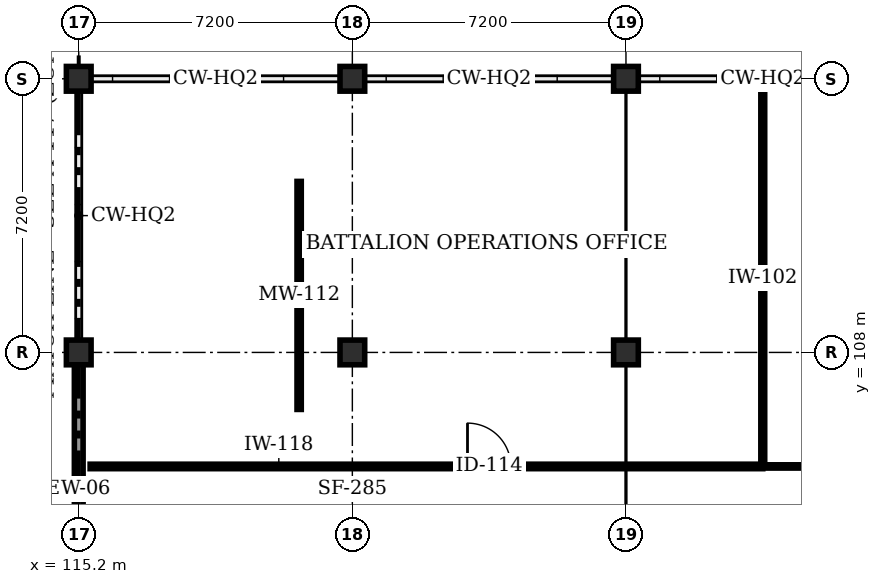
"""IFC4 building model, lengths in metres.
Left out: names, types, materials, properties, quantities, classifications, styles, units other than length and angle.
Written with IfcOpenShell. Run it as: python <this file> out.ifc"""

import sys

from ifc_helpers import new_model, si_unit, direction, frame, frame_2d, origin, origin_2d, place, context, subcontext, project, spatial, rectangle, extrude, element, fill, save


model = new_model("IFC4")
c1 = context("Model", 3, precision=1e-05, world=origin(), true_north=direction((0.0, 1.0)))
c2 = subcontext(c1, "Body", "Model", "MODEL_VIEW")
j1 = project(units=[si_unit("LENGTHUNIT", "METRE"), si_unit("PLANEANGLEUNIT", "RADIAN")], contexts=[c1])
p1 = place(None, origin())
s1 = spatial("IfcSite", under=j1, at=p1, CompositionType="ELEMENT")
p2 = place(p1, origin())
s2 = spatial("IfcBuilding", under=s1, at=p2, CompositionType="ELEMENT")
p3 = place(p2, frame((0.0, 0.0, 6.0)))
s3 = spatial("IfcBuildingStorey", under=s2, at=p3, CompositionType="ELEMENT", Elevation=6.0)
for number, where, z_axis, x_axis in (
    (1, (115.2, 108.0, 0.0), (0.0, 0.0, 1.0), (1.0, 0.0, 0.0)),
    (2, (115.2, 115.2, 0.0), (0.0, 0.0, 1.0), (1.0, 0.0, 0.0)),
    (3, (122.4, 108.0, 0.0), (0.0, 0.0, 1.0), (1.0, 0.0, 0.0)),
    (4, (122.4, 115.2, 0.0), (0.0, 0.0, 1.0), (1.0, 0.0, 0.0)),
    (5, (129.6, 108.0, 0.0), (0.0, 0.0, 1.0), (1.0, 0.0, 0.0)),
    (6, (129.6, 115.2, 0.0), (0.0, 0.0, 1.0), (1.0, 0.0, 0.0)),
):
    element("IfcColumn", number, at=place(p3, frame(where, z_axis=z_axis, x_axis=x_axis)), inside=s3, PredefinedType="COLUMN", context=c2, shape_type="SweptSolid", body=[
        extrude(rectangle(XDim=0.65, YDim=0.65, at=origin_2d()), origin(), (0.0, 0.0, 1.0), 4.2),
    ])
p4 = place(p3, frame((115.2, 108.0, 0.0), z_axis=(0.0, 0.0, 1.0), x_axis=(0.0, -1.0, 0.0)))
e7 = element("IfcWall", 7, at=p4, inside=s3, PredefinedType="STANDARD", context=c2, shape_type="SweptSolid", body=[
    extrude(rectangle(XDim=7.2, YDim=0.23, at=frame_2d((3.6, 0.0))), origin(), (0.0, 0.0, 1.0), 3.247),
])
p5 = place(p3, frame((115.5, 105.0, 0.0), z_axis=(0.0, 0.0, 1.0), x_axis=(1.0, 0.0, 0.0)))
e8 = element("IfcWall", 8, at=p5, inside=s3, PredefinedType="STANDARD", context=c2, shape_type="SweptSolid", body=[
    extrude(rectangle(XDim=17.7, YDim=0.118, at=frame_2d((8.85, 0.0))), origin(), (0.0, 0.0, 1.0), 3.328),
])
p6 = place(p5, frame((9.93, 0.0, 0.0)))
e9 = element("IfcOpeningElement", 9, at=p6, cuts=e8, PredefinedType="OPENING", context=c2, shape_type="SweptSolid", body=[
    extrude(rectangle(XDim=1.14, YDim=2.2, at=frame_2d((0.57, 1.1))), frame((0.0, 0.069, 0.0), z_axis=(0.0, -1.0, 0.0), x_axis=(1.0, 0.0, 0.0)), (0.0, 0.0, 1.0), 0.138),
])
p7 = place(p3, frame((133.2, 105.0, 0.0), z_axis=(0.0, 0.0, 1.0), x_axis=(0.0, 1.0, 0.0)))
e10 = element("IfcWall", 10, at=p7, inside=s3, PredefinedType="STANDARD", context=c2, shape_type="SweptSolid", body=[
    extrude(rectangle(XDim=9.9, YDim=0.102, at=frame_2d((4.95, 0.0))), origin(), (0.0, 0.0, 1.0), 3.247),
])
p8 = place(p3, frame((133.2, 105.0, 0.0), z_axis=(0.0, 0.0, 1.0), x_axis=(1.0, 0.0, 0.0)))
e11 = element("IfcWall", 11, at=p8, inside=s3, PredefinedType="STANDARD", context=c2, shape_type="SweptSolid", body=[
    extrude(rectangle(XDim=13.6, YDim=0.086, at=frame_2d((6.8, 0.0))), origin(), (0.0, 0.0, 1.0), 3.328),
])
p9 = place(p8, frame((6.65, 0.0, 0.0)))
e12 = element("IfcOpeningElement", 12, at=p9, cuts=e11, PredefinedType="OPENING", context=c2, shape_type="SweptSolid", body=[
    extrude(rectangle(XDim=1.1, YDim=2.2, at=frame_2d((0.55, 1.1))), frame((0.0, 0.053, 0.0), z_axis=(0.0, -1.0, 0.0), x_axis=(1.0, 0.0, 0.0)), (0.0, 0.0, 1.0), 0.106),
])
p10 = place(p3, frame((121.0, 106.5, 0.0), z_axis=(0.0, 0.0, 1.0), x_axis=(0.0, 1.0, 0.0)))
e13 = element("IfcWall", 13, at=p10, inside=s3, PredefinedType="MOVABLE", context=c2, shape_type="SweptSolid", body=[
    extrude(rectangle(XDim=6.0, YDim=0.112, at=frame_2d((3.0, 0.0))), origin(), (0.0, 0.0, 1.0), 3.247),
])
p11 = place(p6, origin())
e14 = element("IfcDoor", 14, at=p11, inside=s3, OperationType="SINGLE_SWING_LEFT", PredefinedType="DOOR", context=c2, shape_type="SweptSolid", body=[
    extrude(rectangle(XDim=1.14, YDim=2.2, at=frame_2d((0.57, 1.1))), frame((0.0, 0.025, 0.0), z_axis=(0.0, -1.0, 0.0), x_axis=(1.0, 0.0, 0.0)), (0.0, 0.0, 1.0), 0.05),
])
fill(e9, e14)
save(model, sys.argv[1])
